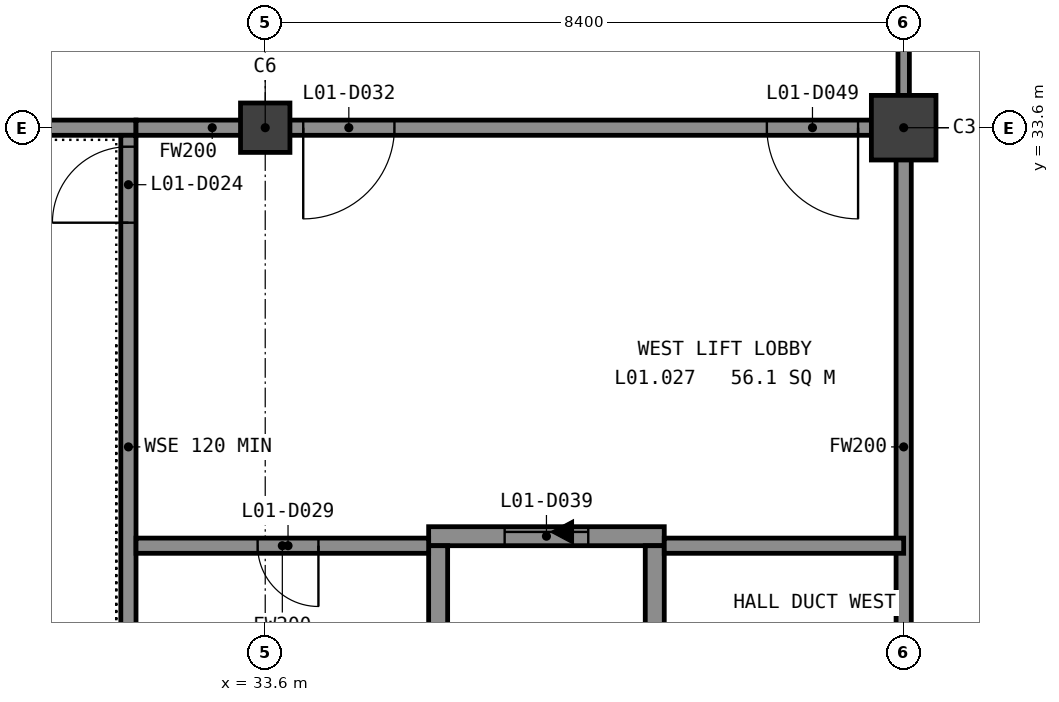
"""IFC4 building model, lengths in metres.
Left out: names, types, materials, properties, quantities, classifications, styles, units other than length and angle.
Written with IfcOpenShell. Run it as: python <this file> out.ifc"""

import sys

from ifc_helpers import new_model, si_unit, direction, frame, frame_2d, origin, origin_2d, place, context, subcontext, project, spatial, rectangle, extrude, element, fill, save


model = new_model("IFC4")
c1 = context("Model", 3, precision=1e-05, world=origin(), true_north=direction((0.0, 1.0)))
c2 = subcontext(c1, "Body", "Model", "MODEL_VIEW")
j1 = project(units=[si_unit("LENGTHUNIT", "METRE"), si_unit("PLANEANGLEUNIT", "RADIAN")], contexts=[c1])
p1 = place(None, origin())
s1 = spatial("IfcSite", under=j1, at=p1, CompositionType="ELEMENT")
p2 = place(p1, origin())
s2 = spatial("IfcBuilding", under=s1, at=p2, CompositionType="ELEMENT")
p3 = place(p2, frame((0.0, 0.0, 5.4)))
s3 = spatial("IfcBuildingStorey", under=s2, at=p3, CompositionType="ELEMENT", Elevation=5.4)
p4 = place(p3, frame((33.6, 33.6, -0.3), z_axis=(0.0, 0.0, 1.0), x_axis=(1.0, 0.0, 0.0)))
e1 = element("IfcColumn", 1, at=p4, inside=s3, PredefinedType="COLUMN", context=c2, shape_type="SweptSolid", body=[
    extrude(rectangle(XDim=0.65, YDim=0.65, at=origin_2d()), origin(), (0.0, 0.0, 1.0), 4.55),
])
p5 = place(p3, frame((42.0, 33.6, -0.3), z_axis=(0.0, 0.0, 1.0), x_axis=(1.0, 0.0, 0.0)))
e2 = element("IfcColumn", 2, at=p5, inside=s3, PredefinedType="COLUMN", context=c2, shape_type="SweptSolid", body=[
    extrude(rectangle(XDim=0.85, YDim=0.85, at=origin_2d()), origin(), (0.0, 0.0, 1.0), 4.55),
])
p6 = place(p3, frame((35.75, 28.225, -0.3), z_axis=(0.0, 0.0, 1.0), x_axis=(1.0, 0.0, 0.0)))
e3 = element("IfcWall", 3, at=p6, inside=s3, PredefinedType="SHEAR", context=c2, shape_type="SweptSolid", body=[
    extrude(rectangle(XDim=3.1, YDim=0.25, at=frame_2d((1.55, 0.0))), origin(), (0.0, 0.0, 1.0), 4.55),
])
p7 = place(p6, frame((1.0, 0.0, 0.3)))
e4 = element("IfcOpeningElement", 4, at=p7, cuts=e3, PredefinedType="OPENING", context=c2, shape_type="SweptSolid", body=[
    extrude(rectangle(XDim=1.1, YDim=2.1, at=frame_2d((0.55, 1.05))), frame((0.0, 0.135, 0.0), z_axis=(0.0, -1.0, 0.0), x_axis=(1.0, 0.0, 0.0)), (0.0, 0.0, 1.0), 0.27),
])
for number, where, z_axis, x_axis in (
    (5, (35.875, 25.2, -0.3), (0.0, 0.0, 1.0), (0.0, 1.0, 0.0)),
    (6, (38.725, 25.2, -0.3), (0.0, 0.0, 1.0), (0.0, 1.0, 0.0)),
):
    element("IfcWall", number, at=place(p3, frame(where, z_axis=z_axis, x_axis=x_axis)), inside=s3, PredefinedType="SHEAR", context=c2, shape_type="SweptSolid", body=[
        extrude(rectangle(XDim=2.9, YDim=0.25, at=frame_2d((1.45, 0.0))), origin(), (0.0, 0.0, 1.0), 4.55),
    ])
p8 = place(p3, frame((27.5, 33.6, -0.3), z_axis=(0.0, 0.0, 1.0), x_axis=(1.0, 0.0, 0.0)))
e7 = element("IfcWall", 7, at=p8, inside=s3, PredefinedType="SHEAR", context=c2, shape_type="SweptSolid", body=[
    extrude(rectangle(XDim=4.4, YDim=0.2, at=frame_2d((2.2, 0.0))), origin(), (0.0, 0.0, 1.0), 4.5),
])
p9 = place(p3, frame((31.8, 25.3, -0.3), z_axis=(0.0, 0.0, 1.0), x_axis=(0.0, 1.0, 0.0)))
e8 = element("IfcWall", 8, at=p9, inside=s3, PredefinedType="SHEAR", context=c2, shape_type="SweptSolid", body=[
    extrude(rectangle(XDim=8.2, YDim=0.2, at=frame_2d((4.1, 0.0))), origin(), (0.0, 0.0, 1.0), 4.5),
])
p10 = place(p9, frame((7.05, 0.0, 0.3)))
e9 = element("IfcOpeningElement", 9, at=p10, cuts=e8, PredefinedType="OPENING", context=c2, shape_type="SweptSolid", body=[
    extrude(rectangle(XDim=1.0, YDim=2.1, at=frame_2d((0.5, 1.05))), frame((0.0, 0.11, 0.0), z_axis=(0.0, -1.0, 0.0), x_axis=(1.0, 0.0, 0.0)), (0.0, 0.0, 1.0), 0.22),
])
p11 = place(p3, frame((42.0, 25.3, -0.3), z_axis=(0.0, 0.0, 1.0), x_axis=(0.0, 1.0, 0.0)))
e10 = element("IfcWall", 10, at=p11, inside=s3, PredefinedType="SOLIDWALL", context=c2, shape_type="SweptSolid", body=[
    extrude(rectangle(XDim=8.2, YDim=0.2, at=frame_2d((4.1, 0.0))), origin(), (0.0, 0.0, 1.0), 3.9),
])
p12 = place(p3, frame((42.0, 33.7, -0.3), z_axis=(0.0, 0.0, 1.0), x_axis=(0.0, 1.0, 0.0)))
e11 = element("IfcWall", 11, at=p12, inside=s3, PredefinedType="PARTITIONING", context=c2, shape_type="SweptSolid", body=[
    extrude(rectangle(XDim=4.025, YDim=0.15, at=frame_2d((2.013, 0.0))), origin(), (0.0, 0.0, 1.0), 4.5),
])
p13 = place(p3, frame((31.9, 28.1, 0.0), z_axis=(0.0, 0.0, 1.0), x_axis=(1.0, 0.0, 0.0)))
e12 = element("IfcWall", 12, at=p13, inside=s3, PredefinedType="SOLIDWALL", context=c2, shape_type="SweptSolid", body=[
    extrude(rectangle(XDim=3.85, YDim=0.2, at=frame_2d((1.925, 0.0))), origin(), (0.0, 0.0, 1.0), 4.2),
])
p14 = place(p13, frame((1.6, 0.0, 0.0)))
e13 = element("IfcOpeningElement", 13, at=p14, cuts=e12, PredefinedType="OPENING", context=c2, shape_type="SweptSolid", body=[
    extrude(rectangle(XDim=0.8, YDim=2.1, at=frame_2d((0.4, 1.05))), frame((0.0, 0.11, 0.0), z_axis=(0.0, -1.0, 0.0), x_axis=(1.0, 0.0, 0.0)), (0.0, 0.0, 1.0), 0.22),
])
p15 = place(p3, frame((38.85, 28.1, 0.0), z_axis=(0.0, 0.0, 1.0), x_axis=(1.0, 0.0, 0.0)))
e14 = element("IfcWall", 14, at=p15, inside=s3, PredefinedType="SOLIDWALL", context=c2, shape_type="SweptSolid", body=[
    extrude(rectangle(XDim=3.15, YDim=0.2, at=frame_2d((1.575, 0.0))), origin(), (0.0, 0.0, 1.0), 4.2),
])
p16 = place(p3, frame((31.9, 33.6, 0.0), z_axis=(0.0, 0.0, 1.0), x_axis=(1.0, 0.0, 0.0)))
e15 = element("IfcWall", 15, at=p16, inside=s3, PredefinedType="SOLIDWALL", context=c2, shape_type="SweptSolid", body=[
    extrude(rectangle(XDim=2.005, YDim=0.2, at=frame_2d((1.002, 0.0))), origin(), (0.0, 0.0, 1.0), 4.2),
])
p17 = place(p3, frame((33.905, 33.6, 0.0), z_axis=(0.0, 0.0, 1.0), x_axis=(1.0, 0.0, 0.0)))
e16 = element("IfcWall", 16, at=p17, inside=s3, PredefinedType="SOLIDWALL", context=c2, shape_type="SweptSolid", body=[
    extrude(rectangle(XDim=8.095, YDim=0.2, at=frame_2d((4.047, 0.0))), origin(), (0.0, 0.0, 1.0), 3.5),
])
p18 = place(p17, frame((0.195, 0.0, 0.0)))
e17 = element("IfcOpeningElement", 17, at=p18, cuts=e16, PredefinedType="OPENING", context=c2, shape_type="SweptSolid", body=[
    extrude(rectangle(XDim=1.2, YDim=2.1, at=frame_2d((0.6, 1.05))), frame((0.0, 0.11, 0.0), z_axis=(0.0, -1.0, 0.0), x_axis=(1.0, 0.0, 0.0)), (0.0, 0.0, 1.0), 0.22),
])
p19 = place(p17, frame((6.295, 0.0, 0.0)))
e18 = element("IfcOpeningElement", 18, at=p19, cuts=e16, PredefinedType="OPENING", context=c2, shape_type="SweptSolid", body=[
    extrude(rectangle(XDim=1.2, YDim=2.1, at=frame_2d((0.6, 1.05))), frame((0.0, 0.11, 0.0), z_axis=(0.0, -1.0, 0.0), x_axis=(1.0, 0.0, 0.0)), (0.0, 0.0, 1.0), 0.22),
])
p20 = place(p7, origin())
e19 = element("IfcDoor", 19, at=p20, inside=s3, OperationType="SLIDING_TO_LEFT", PredefinedType="DOOR", context=c2, shape_type="SweptSolid", body=[
    extrude(rectangle(XDim=1.1, YDim=2.1, at=frame_2d((0.55, 1.05))), frame((0.0, 0.025, 0.0), z_axis=(0.0, -1.0, 0.0), x_axis=(1.0, 0.0, 0.0)), (0.0, 0.0, 1.0), 0.05),
])
fill(e4, e19)
p21 = place(p10, origin())
e20 = element("IfcDoor", 20, at=p21, inside=s3, OperationType="SINGLE_SWING_RIGHT", PredefinedType="DOOR", context=c2, shape_type="SweptSolid", body=[
    extrude(rectangle(XDim=1.0, YDim=2.1, at=frame_2d((0.5, 1.05))), frame((0.0, 0.025, 0.0), z_axis=(0.0, -1.0, 0.0), x_axis=(1.0, 0.0, 0.0)), (0.0, 0.0, 1.0), 0.05),
])
fill(e9, e20)
p22 = place(p14, origin())
e21 = element("IfcDoor", 21, at=p22, inside=s3, OperationType="SINGLE_SWING_RIGHT", PredefinedType="DOOR", context=c2, shape_type="SweptSolid", body=[
    extrude(rectangle(XDim=0.8, YDim=2.1, at=frame_2d((0.4, 1.05))), frame((0.0, 0.025, 0.0), z_axis=(0.0, -1.0, 0.0), x_axis=(1.0, 0.0, 0.0)), (0.0, 0.0, 1.0), 0.05),
])
fill(e13, e21)
p23 = place(p18, origin())
e22 = element("IfcDoor", 22, at=p23, inside=s3, OperationType="SINGLE_SWING_LEFT", PredefinedType="DOOR", context=c2, shape_type="SweptSolid", body=[
    extrude(rectangle(XDim=1.2, YDim=2.1, at=frame_2d((0.6, 1.05))), frame((0.0, 0.025, 0.0), z_axis=(0.0, -1.0, 0.0), x_axis=(1.0, 0.0, 0.0)), (0.0, 0.0, 1.0), 0.05),
])
fill(e17, e22)
p24 = place(p19, origin())
e23 = element("IfcDoor", 23, at=p24, inside=s3, OperationType="SINGLE_SWING_RIGHT", PredefinedType="DOOR", context=c2, shape_type="SweptSolid", body=[
    extrude(rectangle(XDim=1.2, YDim=2.1, at=frame_2d((0.6, 1.05))), frame((0.0, 0.025, 0.0), z_axis=(0.0, -1.0, 0.0), x_axis=(1.0, 0.0, 0.0)), (0.0, 0.0, 1.0), 0.05),
])
fill(e18, e23)
save(model, sys.argv[1])
